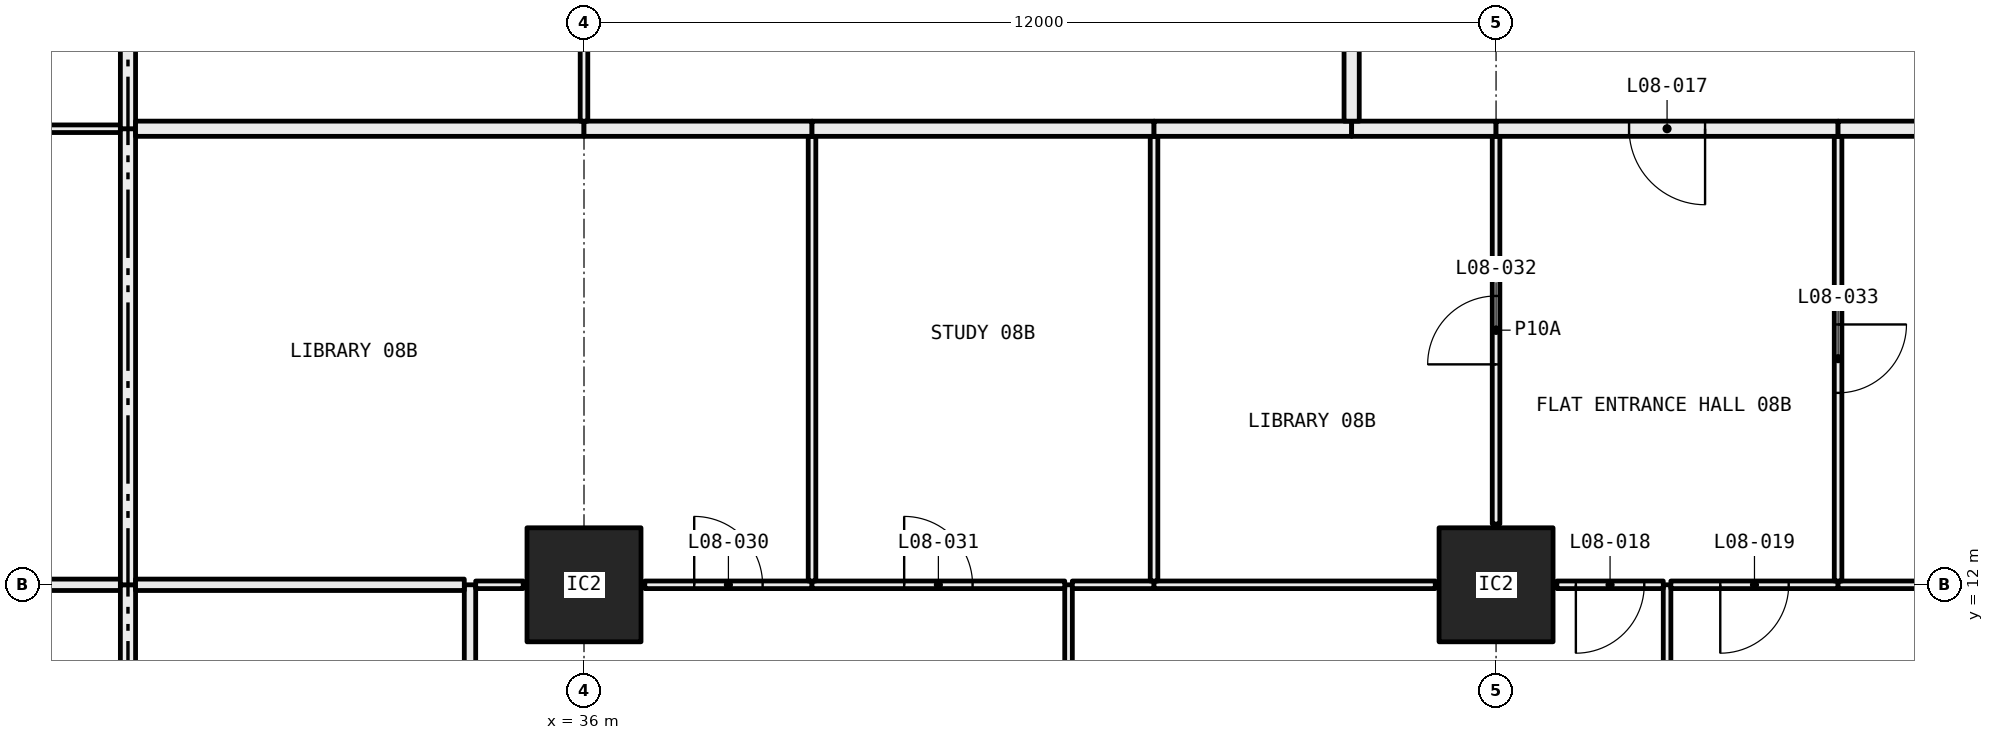
"""IFC4 building model, lengths in metres.
Left out: names, types, materials, properties, quantities, classifications, styles, units other than length and angle.
Written with IfcOpenShell. Run it as: python <this file> out.ifc"""

import sys

from ifc_helpers import new_model, si_unit, direction, frame, frame_2d, origin, origin_2d, place, context, subcontext, project, spatial, rectangle, hollow_rectangle, extrude, element, fill, save


model = new_model("IFC4")
c1 = context("Model", 3, precision=1e-05, world=origin(), true_north=direction((0.0, 1.0)))
c2 = subcontext(c1, "Body", "Model", "MODEL_VIEW")
j1 = project(units=[si_unit("LENGTHUNIT", "METRE"), si_unit("PLANEANGLEUNIT", "RADIAN")], contexts=[c1])
p1 = place(None, origin())
s1 = spatial("IfcSite", under=j1, at=p1, CompositionType="ELEMENT")
p2 = place(p1, origin())
s2 = spatial("IfcBuilding", under=s1, at=p2, CompositionType="ELEMENT")
p3 = place(p2, frame((0.0, 0.0, 40.35)))
s3 = spatial("IfcBuildingStorey", under=s2, at=p3, CompositionType="ELEMENT", Elevation=40.35)
for number, where, z_axis, x_axis in (
    (1, (36.0, 12.0, 0.0), (0.0, 0.0, 1.0), (1.0, 0.0, 0.0)),
    (2, (48.0, 12.0, 0.0), (0.0, 0.0, 1.0), (1.0, 0.0, 0.0)),
):
    element("IfcColumn", number, at=place(p3, frame(where, z_axis=z_axis, x_axis=x_axis)), inside=s3, PredefinedType="COLUMN", context=c2, shape_type="SweptSolid", body=[
        extrude(hollow_rectangle(XDim=1.5, YDim=1.5, WallThickness=0.065, at=origin_2d()), origin(), (0.0, 0.0, 1.0), 3.05),
    ])
p4 = place(p3, frame((29.9, 12.0, 0.0), z_axis=(0.0, 0.0, 1.0), x_axis=(-1.0, 0.0, 0.0)))
e3 = element("IfcWall", 3, at=p4, inside=s3, PredefinedType="PARTITIONING", context=c2, shape_type="SweptSolid", body=[
    extrude(rectangle(XDim=4.325, YDim=0.15, at=frame_2d((2.163, 0.0))), origin(), (0.0, 0.0, 1.0), 2.45),
])
p5 = place(p3, frame((30.0, 9.0, 0.0), z_axis=(0.0, 0.0, 1.0), x_axis=(0.0, 1.0, 0.0)))
e4 = element("IfcWall", 4, at=p5, inside=s3, PredefinedType="PARTITIONING", context=c2, shape_type="SweptSolid", body=[
    extrude(rectangle(XDim=3.0, YDim=0.2, at=frame_2d((1.5, 0.0))), origin(), (0.0, 0.0, 1.0), 2.45),
])
p6 = place(p3, frame((29.9, 18.0, 0.0), z_axis=(0.0, 0.0, 1.0), x_axis=(-1.0, 0.0, 0.0)))
e5 = element("IfcWall", 5, at=p6, inside=s3, PredefinedType="PARTITIONING", context=c2, shape_type="SweptSolid", body=[
    extrude(rectangle(XDim=3.9, YDim=0.1, at=frame_2d((1.95, 0.0))), origin(), (0.0, 0.0, 1.0), 3.05),
])
p7 = place(p6, frame((1.5, 0.0, 0.0)))
e6 = element("IfcOpeningElement", 6, at=p7, cuts=e5, PredefinedType="OPENING", context=c2, shape_type="SweptSolid", body=[
    extrude(rectangle(XDim=0.9, YDim=2.1, at=frame_2d((0.45, 1.05))), frame((0.0, 0.06, 0.0), z_axis=(0.0, -1.0, 0.0), x_axis=(1.0, 0.0, 0.0)), (0.0, 0.0, 1.0), 0.12),
])
p8 = place(p3, frame((30.0, 12.0, 0.0), z_axis=(0.0, 0.0, 1.0), x_axis=(0.0, 1.0, 0.0)))
e7 = element("IfcWall", 7, at=p8, inside=s3, PredefinedType="PARTITIONING", context=c2, shape_type="SweptSolid", body=[
    extrude(rectangle(XDim=6.0, YDim=0.2, at=frame_2d((3.0, 0.0))), origin(), (0.0, 0.0, 1.0), 2.45),
])
p9 = place(p3, frame((30.0, 18.0, 0.0), z_axis=(0.0, 0.0, 1.0), x_axis=(0.0, 1.0, 0.0)))
e8 = element("IfcWall", 8, at=p9, inside=s3, PredefinedType="PARTITIONING", context=c2, shape_type="SweptSolid", body=[
    extrude(rectangle(XDim=6.3, YDim=0.2, at=frame_2d((3.15, 0.0))), origin(), (0.0, 0.0, 1.0), 2.45),
])
p10 = place(p3, frame((34.5, 9.075, 0.0), z_axis=(0.0, 0.0, 1.0), x_axis=(0.0, 1.0, 0.0)))
e9 = element("IfcWall", 9, at=p10, inside=s3, PredefinedType="PARTITIONING", context=c2, shape_type="SweptSolid", body=[
    extrude(rectangle(XDim=2.925, YDim=0.15, at=frame_2d((1.462, 0.0))), origin(), (0.0, 0.0, 1.0), 2.45),
])
p11 = place(p10, frame((1.012, 0.0, 0.0)))
e10 = element("IfcOpeningElement", 10, at=p11, cuts=e9, PredefinedType="OPENING", context=c2, shape_type="SweptSolid", body=[
    extrude(rectangle(XDim=0.9, YDim=2.1, at=frame_2d((0.45, 1.05))), frame((0.0, 0.085, 0.0), z_axis=(0.0, -1.0, 0.0), x_axis=(1.0, 0.0, 0.0)), (0.0, 0.0, 1.0), 0.17),
])
p12 = place(p3, frame((34.425, 12.0, 0.0), z_axis=(0.0, 0.0, 1.0), x_axis=(-1.0, 0.0, 0.0)))
e11 = element("IfcWall", 11, at=p12, inside=s3, PredefinedType="PARTITIONING", context=c2, shape_type="SweptSolid", body=[
    extrude(rectangle(XDim=4.325, YDim=0.15, at=frame_2d((2.163, 0.0))), origin(), (0.0, 0.0, 1.0), 2.45),
])
p13 = place(p3, frame((42.375, 6.05, 0.0), z_axis=(0.0, 0.0, 1.0), x_axis=(0.0, 1.0, 0.0)))
e12 = element("IfcWall", 12, at=p13, inside=s3, PredefinedType="PARTITIONING", context=c2, shape_type="SweptSolid", body=[
    extrude(rectangle(XDim=5.95, YDim=0.1, at=frame_2d((2.975, 0.0))), origin(), (0.0, 0.0, 1.0), 2.45),
])
p14 = place(p13, frame((2.525, 0.0, 0.0)))
e13 = element("IfcOpeningElement", 13, at=p14, cuts=e12, PredefinedType="OPENING", context=c2, shape_type="SweptSolid", body=[
    extrude(rectangle(XDim=0.9, YDim=2.1, at=frame_2d((0.45, 1.05))), frame((0.0, 0.06, 0.0), z_axis=(0.0, -1.0, 0.0), x_axis=(1.0, 0.0, 0.0)), (0.0, 0.0, 1.0), 0.12),
])
p15 = place(p3, frame((35.2, 12.0, 0.0), z_axis=(0.0, 0.0, 1.0), x_axis=(-1.0, 0.0, 0.0)))
e14 = element("IfcWall", 14, at=p15, inside=s3, PredefinedType="PARTITIONING", context=c2, shape_type="SweptSolid", body=[
    extrude(rectangle(XDim=0.625, YDim=0.1, at=frame_2d((0.312, 0.0))), origin(), (0.0, 0.0, 1.0), 2.45),
])
p16 = place(p3, frame((39.0, 12.0, 0.0), z_axis=(0.0, 0.0, 1.0), x_axis=(-1.0, 0.0, 0.0)))
e15 = element("IfcWall", 15, at=p16, inside=s3, PredefinedType="PARTITIONING", context=c2, shape_type="SweptSolid", body=[
    extrude(rectangle(XDim=2.2, YDim=0.1, at=frame_2d((1.1, 0.0))), origin(), (0.0, 0.0, 1.0), 2.45),
])
p17 = place(p16, frame((0.65, 0.0, 0.0)))
e16 = element("IfcOpeningElement", 16, at=p17, cuts=e15, PredefinedType="OPENING", context=c2, shape_type="SweptSolid", body=[
    extrude(rectangle(XDim=0.9, YDim=2.1, at=frame_2d((0.45, 1.05))), frame((0.0, 0.06, 0.0), z_axis=(0.0, -1.0, 0.0), x_axis=(1.0, 0.0, 0.0)), (0.0, 0.0, 1.0), 0.12),
])
p18 = place(p3, frame((42.325, 12.0, 0.0), z_axis=(0.0, 0.0, 1.0), x_axis=(-1.0, 0.0, 0.0)))
e17 = element("IfcWall", 17, at=p18, inside=s3, PredefinedType="PARTITIONING", context=c2, shape_type="SweptSolid", body=[
    extrude(rectangle(XDim=3.325, YDim=0.1, at=frame_2d((1.663, 0.0))), origin(), (0.0, 0.0, 1.0), 2.45),
])
p19 = place(p18, frame((1.212, 0.0, 0.0)))
e18 = element("IfcOpeningElement", 18, at=p19, cuts=e17, PredefinedType="OPENING", context=c2, shape_type="SweptSolid", body=[
    extrude(rectangle(XDim=0.9, YDim=2.1, at=frame_2d((0.45, 1.05))), frame((0.0, 0.06, 0.0), z_axis=(0.0, -1.0, 0.0), x_axis=(1.0, 0.0, 0.0)), (0.0, 0.0, 1.0), 0.12),
])
p20 = place(p3, frame((50.25, 6.05, 0.0), z_axis=(0.0, 0.0, 1.0), x_axis=(0.0, 1.0, 0.0)))
e19 = element("IfcWall", 19, at=p20, inside=s3, PredefinedType="PARTITIONING", context=c2, shape_type="SweptSolid", body=[
    extrude(rectangle(XDim=5.95, YDim=0.1, at=frame_2d((2.975, 0.0))), origin(), (0.0, 0.0, 1.0), 2.45),
])
p21 = place(p3, frame((43.5, 12.0, 0.0), z_axis=(0.0, 0.0, 1.0), x_axis=(-1.0, 0.0, 0.0)))
e20 = element("IfcWall", 20, at=p21, inside=s3, PredefinedType="PARTITIONING", context=c2, shape_type="SweptSolid", body=[
    extrude(rectangle(XDim=1.075, YDim=0.1, at=frame_2d((0.538, 0.0))), origin(), (0.0, 0.0, 1.0), 2.45),
])
p22 = place(p3, frame((47.2, 12.0, 0.0), z_axis=(0.0, 0.0, 1.0), x_axis=(-1.0, 0.0, 0.0)))
e21 = element("IfcWall", 21, at=p22, inside=s3, PredefinedType="PARTITIONING", context=c2, shape_type="SweptSolid", body=[
    extrude(rectangle(XDim=3.7, YDim=0.1, at=frame_2d((1.85, 0.0))), origin(), (0.0, 0.0, 1.0), 2.45),
])
p23 = place(p3, frame((50.2, 12.0, 0.0), z_axis=(0.0, 0.0, 1.0), x_axis=(-1.0, 0.0, 0.0)))
e22 = element("IfcWall", 22, at=p23, inside=s3, PredefinedType="PARTITIONING", context=c2, shape_type="SweptSolid", body=[
    extrude(rectangle(XDim=1.4, YDim=0.1, at=frame_2d((0.7, 0.0))), origin(), (0.0, 0.0, 1.0), 2.45),
])
p24 = place(p23, frame((0.25, 0.0, 0.0)))
e23 = element("IfcOpeningElement", 23, at=p24, cuts=e22, PredefinedType="OPENING", context=c2, shape_type="SweptSolid", body=[
    extrude(rectangle(XDim=0.9, YDim=2.1, at=frame_2d((0.45, 1.05))), frame((0.0, 0.06, 0.0), z_axis=(0.0, -1.0, 0.0), x_axis=(1.0, 0.0, 0.0)), (0.0, 0.0, 1.0), 0.12),
])
p25 = place(p3, frame((52.5, 12.0, 0.0), z_axis=(0.0, 0.0, 1.0), x_axis=(-1.0, 0.0, 0.0)))
e24 = element("IfcWall", 24, at=p25, inside=s3, PredefinedType="PARTITIONING", context=c2, shape_type="SweptSolid", body=[
    extrude(rectangle(XDim=2.2, YDim=0.1, at=frame_2d((1.1, 0.0))), origin(), (0.0, 0.0, 1.0), 2.45),
])
p26 = place(p25, frame((0.65, 0.0, 0.0)))
e25 = element("IfcOpeningElement", 25, at=p26, cuts=e24, PredefinedType="OPENING", context=c2, shape_type="SweptSolid", body=[
    extrude(rectangle(XDim=0.9, YDim=2.1, at=frame_2d((0.45, 1.05))), frame((0.0, 0.06, 0.0), z_axis=(0.0, -1.0, 0.0), x_axis=(1.0, 0.0, 0.0)), (0.0, 0.0, 1.0), 0.12),
])
p27 = place(p3, frame((58.075, 12.0, 0.0), z_axis=(0.0, 0.0, 1.0), x_axis=(-1.0, 0.0, 0.0)))
e26 = element("IfcWall", 26, at=p27, inside=s3, PredefinedType="PARTITIONING", context=c2, shape_type="SweptSolid", body=[
    extrude(rectangle(XDim=5.575, YDim=0.1, at=frame_2d((2.788, 0.0))), origin(), (0.0, 0.0, 1.0), 2.45),
])
p28 = place(p3, frame((39.0, 12.05, 0.0), z_axis=(0.0, 0.0, 1.0), x_axis=(0.0, 1.0, 0.0)))
e27 = element("IfcWall", 27, at=p28, inside=s3, PredefinedType="PARTITIONING", context=c2, shape_type="SweptSolid", body=[
    extrude(rectangle(XDim=5.85, YDim=0.1, at=frame_2d((2.925, 0.0))), origin(), (0.0, 0.0, 1.0), 2.45),
])
p29 = place(p3, frame((36.0, 18.0, 0.0), z_axis=(0.0, 0.0, 1.0), x_axis=(-1.0, 0.0, 0.0)))
e28 = element("IfcWall", 28, at=p29, inside=s3, PredefinedType="PARTITIONING", context=c2, shape_type="SweptSolid", body=[
    extrude(rectangle(XDim=5.9, YDim=0.2, at=frame_2d((2.95, 0.0))), origin(), (0.0, 0.0, 1.0), 2.45),
])
p30 = place(p3, frame((39.0, 18.0, 0.0), z_axis=(0.0, 0.0, 1.0), x_axis=(-1.0, 0.0, 0.0)))
e29 = element("IfcWall", 29, at=p30, inside=s3, PredefinedType="PARTITIONING", context=c2, shape_type="SweptSolid", body=[
    extrude(rectangle(XDim=3.0, YDim=0.2, at=frame_2d((1.5, 0.0))), origin(), (0.0, 0.0, 1.0), 2.45),
])
p31 = place(p3, frame((43.5, 12.05, 0.0), z_axis=(0.0, 0.0, 1.0), x_axis=(0.0, 1.0, 0.0)))
e30 = element("IfcWall", 30, at=p31, inside=s3, PredefinedType="PARTITIONING", context=c2, shape_type="SweptSolid", body=[
    extrude(rectangle(XDim=5.85, YDim=0.1, at=frame_2d((2.925, 0.0))), origin(), (0.0, 0.0, 1.0), 2.45),
])
p32 = place(p3, frame((43.5, 18.0, 0.0), z_axis=(0.0, 0.0, 1.0), x_axis=(-1.0, 0.0, 0.0)))
e31 = element("IfcWall", 31, at=p32, inside=s3, PredefinedType="PARTITIONING", context=c2, shape_type="SweptSolid", body=[
    extrude(rectangle(XDim=4.5, YDim=0.2, at=frame_2d((2.25, 0.0))), origin(), (0.0, 0.0, 1.0), 3.05),
])
p33 = place(p3, frame((48.0, 12.8, 0.0), z_axis=(0.0, 0.0, 1.0), x_axis=(0.0, 1.0, 0.0)))
e32 = element("IfcWall", 32, at=p33, inside=s3, PredefinedType="PARTITIONING", context=c2, shape_type="SweptSolid", body=[
    extrude(rectangle(XDim=5.1, YDim=0.1, at=frame_2d((2.55, 0.0))), origin(), (0.0, 0.0, 1.0), 3.05),
])
p34 = place(p33, frame((2.1, 0.0, 0.0)))
e33 = element("IfcOpeningElement", 33, at=p34, cuts=e32, PredefinedType="OPENING", context=c2, shape_type="SweptSolid", body=[
    extrude(rectangle(XDim=0.9, YDim=2.1, at=frame_2d((0.45, 1.05))), frame((0.0, 0.06, 0.0), z_axis=(0.0, -1.0, 0.0), x_axis=(1.0, 0.0, 0.0)), (0.0, 0.0, 1.0), 0.12),
])
p35 = place(p3, frame((46.1, 18.0, 0.0), z_axis=(0.0, 0.0, 1.0), x_axis=(-1.0, 0.0, 0.0)))
e34 = element("IfcWall", 34, at=p35, inside=s3, PredefinedType="PARTITIONING", context=c2, shape_type="SweptSolid", body=[
    extrude(rectangle(XDim=2.6, YDim=0.2, at=frame_2d((1.3, 0.0))), origin(), (0.0, 0.0, 1.0), 3.05),
])
p36 = place(p3, frame((48.0, 18.0, 0.0), z_axis=(0.0, 0.0, 1.0), x_axis=(-1.0, 0.0, 0.0)))
e35 = element("IfcWall", 35, at=p36, inside=s3, PredefinedType="PARTITIONING", context=c2, shape_type="SweptSolid", body=[
    extrude(rectangle(XDim=1.9, YDim=0.2, at=frame_2d((0.95, 0.0))), origin(), (0.0, 0.0, 1.0), 3.05),
])
p37 = place(p3, frame((52.5, 12.05, 0.0), z_axis=(0.0, 0.0, 1.0), x_axis=(0.0, 1.0, 0.0)))
e36 = element("IfcWall", 36, at=p37, inside=s3, PredefinedType="PARTITIONING", context=c2, shape_type="SweptSolid", body=[
    extrude(rectangle(XDim=5.85, YDim=0.1, at=frame_2d((2.925, 0.0))), origin(), (0.0, 0.0, 1.0), 2.45),
])
p38 = place(p37, frame((2.475, 0.0, 0.0)))
e37 = element("IfcOpeningElement", 37, at=p38, cuts=e36, PredefinedType="OPENING", context=c2, shape_type="SweptSolid", body=[
    extrude(rectangle(XDim=0.9, YDim=2.1, at=frame_2d((0.45, 1.05))), frame((0.0, 0.06, 0.0), z_axis=(0.0, -1.0, 0.0), x_axis=(1.0, 0.0, 0.0)), (0.0, 0.0, 1.0), 0.12),
])
p39 = place(p3, frame((52.5, 18.0, 0.0), z_axis=(0.0, 0.0, 1.0), x_axis=(-1.0, 0.0, 0.0)))
e38 = element("IfcWall", 38, at=p39, inside=s3, PredefinedType="PARTITIONING", context=c2, shape_type="SweptSolid", body=[
    extrude(rectangle(XDim=4.5, YDim=0.2, at=frame_2d((2.25, 0.0))), origin(), (0.0, 0.0, 1.0), 3.05),
])
p40 = place(p39, frame((1.75, 0.0, 0.0)))
e39 = element("IfcOpeningElement", 39, at=p40, cuts=e38, PredefinedType="OPENING", context=c2, shape_type="SweptSolid", body=[
    extrude(rectangle(XDim=1.0, YDim=2.1, at=frame_2d((0.5, 1.05))), frame((0.0, 0.11, 0.0), z_axis=(0.0, -1.0, 0.0), x_axis=(1.0, 0.0, 0.0)), (0.0, 0.0, 1.0), 0.22),
])
p41 = place(p3, frame((61.5, 18.0, 0.0), z_axis=(0.0, 0.0, 1.0), x_axis=(-1.0, 0.0, 0.0)))
e40 = element("IfcWall", 40, at=p41, inside=s3, PredefinedType="PARTITIONING", context=c2, shape_type="SweptSolid", body=[
    extrude(rectangle(XDim=9.0, YDim=0.2, at=frame_2d((4.5, 0.0))), origin(), (0.0, 0.0, 1.0), 3.05),
])
p42 = place(p3, frame((36.0, 18.1, 0.0), z_axis=(0.0, 0.0, 1.0), x_axis=(0.0, 1.0, 0.0)))
e41 = element("IfcWall", 41, at=p42, inside=s3, PredefinedType="PARTITIONING", context=c2, shape_type="SweptSolid", body=[
    extrude(rectangle(XDim=5.1, YDim=0.1, at=frame_2d((2.55, 0.0))), origin(), (0.0, 0.0, 1.0), 2.45),
])
p43 = place(p42, frame((2.1, 0.0, 0.0)))
e42 = element("IfcOpeningElement", 42, at=p43, cuts=e41, PredefinedType="OPENING", context=c2, shape_type="SweptSolid", body=[
    extrude(rectangle(XDim=0.9, YDim=2.1, at=frame_2d((0.45, 1.05))), frame((0.0, 0.06, 0.0), z_axis=(0.0, -1.0, 0.0), x_axis=(1.0, 0.0, 0.0)), (0.0, 0.0, 1.0), 0.12),
])
p44 = place(p3, frame((46.1, 18.1, 0.0), z_axis=(0.0, 0.0, 1.0), x_axis=(0.0, 1.0, 0.0)))
e43 = element("IfcWall", 43, at=p44, inside=s3, PredefinedType="PARTITIONING", context=c2, shape_type="SweptSolid", body=[
    extrude(rectangle(XDim=6.2, YDim=0.2, at=frame_2d((3.1, 0.0))), origin(), (0.0, 0.0, 1.0), 2.45),
])
p45 = place(p40, origin())
e44 = element("IfcDoor", 44, at=p45, inside=s3, OperationType="SINGLE_SWING_RIGHT", PredefinedType="DOOR", context=c2, shape_type="SweptSolid", body=[
    extrude(rectangle(XDim=1.0, YDim=2.1, at=frame_2d((0.5, 1.05))), frame((0.0, 0.025, 0.0), z_axis=(0.0, -1.0, 0.0), x_axis=(1.0, 0.0, 0.0)), (0.0, 0.0, 1.0), 0.05),
])
fill(e39, e44)
p46 = place(p24, origin())
e45 = element("IfcDoor", 45, at=p46, inside=s3, OperationType="SINGLE_SWING_LEFT", PredefinedType="DOOR", context=c2, shape_type="SweptSolid", body=[
    extrude(rectangle(XDim=0.9, YDim=2.1, at=frame_2d((0.45, 1.05))), frame((0.0, 0.025, 0.0), z_axis=(0.0, -1.0, 0.0), x_axis=(1.0, 0.0, 0.0)), (0.0, 0.0, 1.0), 0.05),
])
fill(e23, e45)
p47 = place(p26, origin())
e46 = element("IfcDoor", 46, at=p47, inside=s3, OperationType="SINGLE_SWING_LEFT", PredefinedType="DOOR", context=c2, shape_type="SweptSolid", body=[
    extrude(rectangle(XDim=0.9, YDim=2.1, at=frame_2d((0.45, 1.05))), frame((0.0, 0.025, 0.0), z_axis=(0.0, -1.0, 0.0), x_axis=(1.0, 0.0, 0.0)), (0.0, 0.0, 1.0), 0.05),
])
fill(e25, e46)
p48 = place(p17, frame((0.9, 0.0, 0.0), x_axis=(-1.0, 0.0, 0.0)))
e47 = element("IfcDoor", 47, at=p48, inside=s3, OperationType="SINGLE_SWING_RIGHT", PredefinedType="DOOR", context=c2, shape_type="SweptSolid", body=[
    extrude(rectangle(XDim=0.9, YDim=2.1, at=frame_2d((0.45, 1.05))), frame((0.0, 0.025, 0.0), z_axis=(0.0, -1.0, 0.0), x_axis=(1.0, 0.0, 0.0)), (0.0, 0.0, 1.0), 0.05),
])
fill(e16, e47)
p49 = place(p19, frame((0.9, 0.0, 0.0), x_axis=(-1.0, 0.0, 0.0)))
e48 = element("IfcDoor", 48, at=p49, inside=s3, OperationType="SINGLE_SWING_RIGHT", PredefinedType="DOOR", context=c2, shape_type="SweptSolid", body=[
    extrude(rectangle(XDim=0.9, YDim=2.1, at=frame_2d((0.45, 1.05))), frame((0.0, 0.025, 0.0), z_axis=(0.0, -1.0, 0.0), x_axis=(1.0, 0.0, 0.0)), (0.0, 0.0, 1.0), 0.05),
])
fill(e18, e48)
p50 = place(p34, origin())
e49 = element("IfcDoor", 49, at=p50, inside=s3, OperationType="SINGLE_SWING_RIGHT", PredefinedType="DOOR", context=c2, shape_type="SweptSolid", body=[
    extrude(rectangle(XDim=0.9, YDim=2.1, at=frame_2d((0.45, 1.05))), frame((0.0, 0.025, 0.0), z_axis=(0.0, -1.0, 0.0), x_axis=(1.0, 0.0, 0.0)), (0.0, 0.0, 1.0), 0.05),
])
fill(e33, e49)
p51 = place(p38, frame((0.9, 0.0, 0.0), x_axis=(-1.0, 0.0, 0.0)))
e50 = element("IfcDoor", 50, at=p51, inside=s3, OperationType="SINGLE_SWING_RIGHT", PredefinedType="DOOR", context=c2, shape_type="SweptSolid", body=[
    extrude(rectangle(XDim=0.9, YDim=2.1, at=frame_2d((0.45, 1.05))), frame((0.0, 0.025, 0.0), z_axis=(0.0, -1.0, 0.0), x_axis=(1.0, 0.0, 0.0)), (0.0, 0.0, 1.0), 0.05),
])
fill(e37, e50)
save(model, sys.argv[1])
